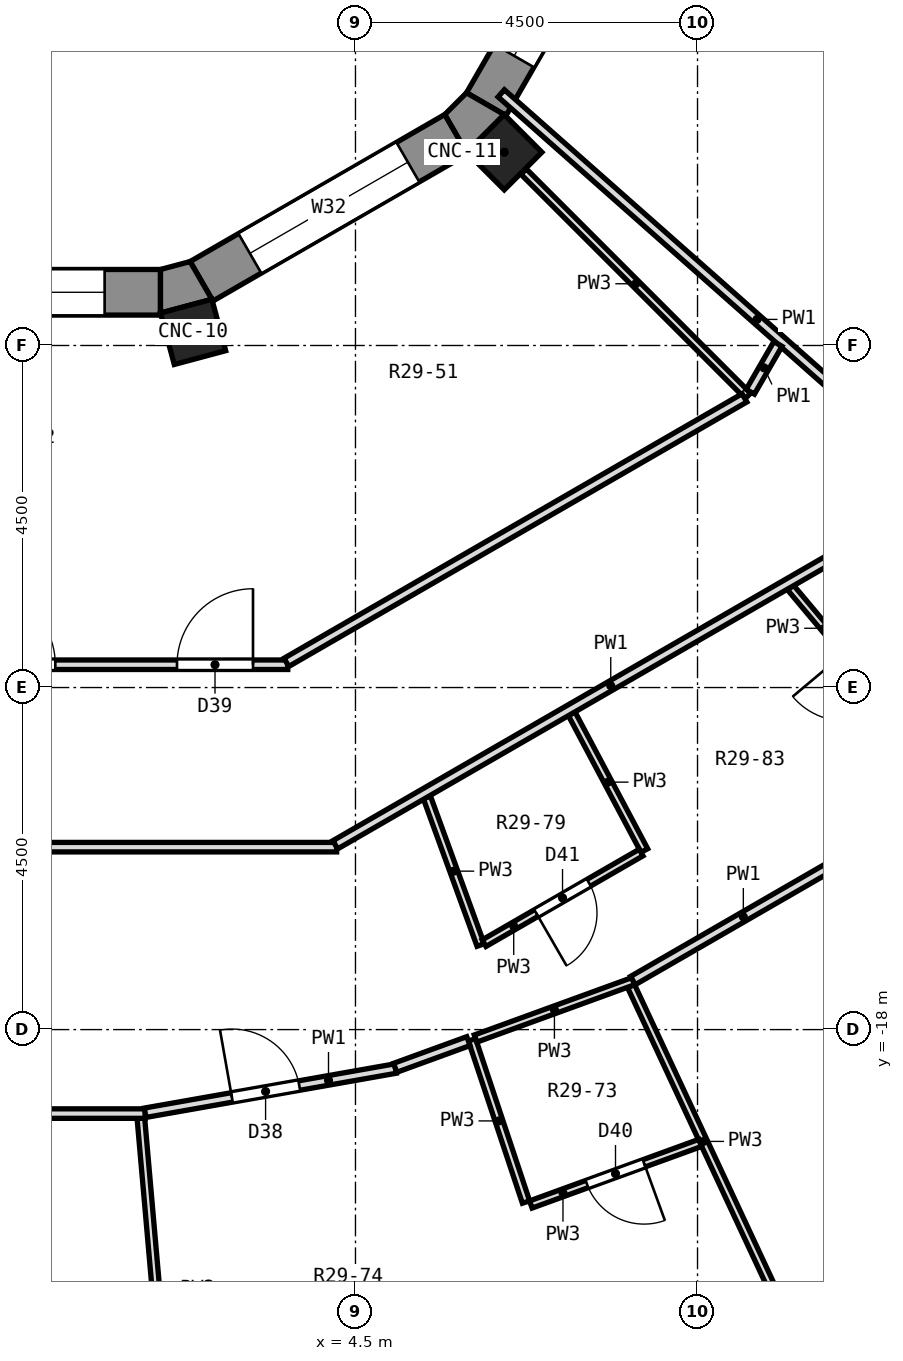
"""IFC4 building model, lengths in metres.
Left out: names, types, materials, properties, quantities, classifications, styles, units other than length and angle.
Written with IfcOpenShell. Run it as: python <this file> out.ifc"""

import sys

from ifc_helpers import new_model, si_unit, direction, frame, frame_2d, origin, origin_2d, place, context, subcontext, project, spatial, polyline, rectangle, outline, extrude, element, fill, save


model = new_model("IFC4")
c1 = context("Model", 3, precision=1e-05, world=origin(), true_north=direction((0.0, 1.0)))
c2 = subcontext(c1, "Body", "Model", "MODEL_VIEW")
j1 = project(units=[si_unit("LENGTHUNIT", "METRE"), si_unit("PLANEANGLEUNIT", "RADIAN")], contexts=[c1])
p1 = place(None, origin())
s1 = spatial("IfcSite", under=j1, at=p1, CompositionType="ELEMENT")
p2 = place(p1, origin())
s2 = spatial("IfcBuilding", under=s1, at=p2, CompositionType="ELEMENT")
p3 = place(p2, frame((0.0, 0.0, 200.4)))
s3 = spatial("IfcBuildingStorey", under=s2, at=p3, CompositionType="ELEMENT", Elevation=200.4)
for number, where, z_axis, x_axis in (
    (1, (2.364, -8.821, 0.0), (0.0, 0.0, 1.0), (0.259, -0.966, 0.0)),
    (2, (6.458, -6.458, 0.0), (0.0, 0.0, 1.0), (0.707, -0.707, 0.0)),
):
    element("IfcColumn", number, at=place(p3, frame(where, z_axis=z_axis, x_axis=x_axis)), inside=s3, PredefinedType="COLUMN", context=c2, shape_type="SweptSolid", body=[
        extrude(rectangle(XDim=0.7, YDim=0.7, at=origin_2d()), origin(), (0.0, 0.0, 1.0), 3.3),
    ])
p4 = place(p3, frame((10.809, -22.171, 0.0), z_axis=(0.0, 0.0, 1.0), x_axis=(0.86602648383, 0.499998129301, 0.0)))
e3 = element("IfcWall", 3, at=p4, inside=s3, PredefinedType="SOLIDWALL", context=c2, shape_type="SweptSolid", body=[
    extrude(rectangle(XDim=3.45, YDim=0.6, at=frame_2d((1.725, 0.0))), origin(), (0.0, 0.0, 1.0), 2.85),
])
p5 = place(p4, frame((0.625, 0.0, 0.9)))
e4 = element("IfcOpeningElement", 4, at=p5, cuts=e3, PredefinedType="OPENING", context=c2, shape_type="SweptSolid", body=[
    extrude(rectangle(XDim=2.2, YDim=1.8, at=frame_2d((1.1, 0.9))), frame((0.0, 0.312, 0.0), z_axis=(0.0, -1.0, 0.0), x_axis=(1.0, 0.0, 0.0)), (0.0, 0.0, 1.0), 0.624),
])
p6 = place(p3, frame((-1.935, -8.3, 0.0), z_axis=(0.0, 0.0, 1.0), x_axis=(1.0, 0.0, 0.0)))
e5 = element("IfcWall", 5, at=p6, inside=s3, PredefinedType="SOLIDWALL", context=c2, shape_type="SweptSolid", body=[
    extrude(rectangle(XDim=3.87, YDim=0.6, at=frame_2d((1.935, 0.0))), origin(), (0.0, 0.0, 1.0), 2.85),
])
p7 = place(p6, frame((0.735, 0.0, 0.9)))
e6 = element("IfcOpeningElement", 6, at=p7, cuts=e5, PredefinedType="OPENING", context=c2, shape_type="SweptSolid", body=[
    extrude(rectangle(XDim=2.4, YDim=1.8, at=frame_2d((1.2, 0.9))), frame((0.0, 0.312, 0.0), z_axis=(0.0, -1.0, 0.0), x_axis=(1.0, 0.0, 0.0)), (0.0, 0.0, 1.0), 0.624),
])
p8 = place(p3, frame((2.474, -8.156, 0.0), z_axis=(0.0, 0.0, 1.0), x_axis=(0.866005929495, 0.500033728941, 0.0)))
e7 = element("IfcWall", 7, at=p8, inside=s3, PredefinedType="SOLIDWALL", context=c2, shape_type="SweptSolid", body=[
    extrude(rectangle(XDim=3.87, YDim=0.6, at=frame_2d((1.935, 0.0))), origin(), (0.0, 0.0, 1.0), 2.85),
])
p9 = place(p8, frame((0.735, 0.0, 0.9)))
e8 = element("IfcOpeningElement", 8, at=p9, cuts=e7, PredefinedType="OPENING", context=c2, shape_type="SweptSolid", body=[
    extrude(rectangle(XDim=2.4, YDim=1.8, at=frame_2d((1.2, 0.9))), frame((0.0, 0.312, 0.0), z_axis=(0.0, -1.0, 0.0), x_axis=(1.0, 0.0, 0.0)), (0.0, 0.0, 1.0), 0.624),
])
p10 = place(p3, frame((6.22, -5.826, 0.0), z_axis=(0.0, 0.0, 1.0), x_axis=(0.500033728941, 0.866005929495, 0.0)))
e9 = element("IfcWall", 9, at=p10, inside=s3, PredefinedType="SOLIDWALL", context=c2, shape_type="SweptSolid", body=[
    extrude(rectangle(XDim=3.87, YDim=0.6, at=frame_2d((1.935, 0.0))), origin(), (0.0, 0.0, 1.0), 2.85),
])
p11 = place(p10, frame((0.735, 0.0, 0.9)))
e10 = element("IfcOpeningElement", 10, at=p11, cuts=e9, PredefinedType="OPENING", context=c2, shape_type="SweptSolid", body=[
    extrude(rectangle(XDim=2.4, YDim=1.8, at=frame_2d((1.2, 0.9))), frame((0.0, 0.312, 0.0), z_axis=(0.0, -1.0, 0.0), x_axis=(1.0, 0.0, 0.0)), (0.0, 0.0, 1.0), 0.624),
])
p12 = place(p3, origin())
e11 = element("IfcWall", 11, at=p12, inside=s3, PredefinedType="SOLIDWALL", context=c2, shape_type="SweptSolid", body=[
    extrude(outline(polyline([(2.611, -8.392), (2.324, -7.896), (1.935, -8.0), (1.935, -8.573), (2.611, -8.392)])), origin(), (0.0, 0.0, 1.0), 2.85),
])
p13 = place(p3, origin())
e12 = element("IfcWall", 12, at=p13, inside=s3, PredefinedType="SOLIDWALL", context=c2, shape_type="SweptSolid", body=[
    extrude(outline(polyline([(5.962, -6.458), (6.458, -5.962), (5.961, -5.676), (5.676, -5.961), (5.962, -6.458)])), origin(), (0.0, 0.0, 1.0), 2.85),
])
p14 = place(p3, frame((1.677, -19.167, 0.0), z_axis=(0.0, 0.0, 1.0), x_axis=(0.087521667832, -0.996162616072, 0.0)))
e13 = element("IfcWall", 13, at=p14, inside=s3, PredefinedType="PARTITIONING", context=c2, shape_type="SweptSolid", body=[
    extrude(rectangle(XDim=4.5, YDim=0.1, at=frame_2d((2.25, 0.0))), origin(), (0.0, 0.0, 1.0), 2.85),
])
p15 = place(p3, frame((6.033, -18.135, 0.0), z_axis=(0.0, 0.0, 1.0), x_axis=(0.316032342538, -0.948748416847, 0.0)))
e14 = element("IfcWall", 14, at=p15, inside=s3, PredefinedType="PARTITIONING", context=c2, shape_type="SweptSolid", body=[
    extrude(rectangle(XDim=2.249, YDim=0.1, at=frame_2d((1.125, 0.0))), origin(), (0.0, 0.0, 1.0), 2.85),
])
p16 = place(p3, frame((5.439, -14.944, 0.0), z_axis=(0.0, 0.0, 1.0), x_axis=(0.341828386263, -0.939762392493, 0.0)))
e15 = element("IfcWall", 15, at=p16, inside=s3, PredefinedType="PARTITIONING", context=c2, shape_type="SweptSolid", body=[
    extrude(rectangle(XDim=2.068, YDim=0.1, at=frame_2d((1.034, 0.0))), origin(), (0.0, 0.0, 1.0), 2.85),
])
p17 = place(p3, frame((8.125, -17.427, 0.0), z_axis=(0.0, 0.0, 1.0), x_axis=(0.422852881861, -0.906198344901, 0.0)))
e16 = element("IfcWall", 16, at=p17, inside=s3, PredefinedType="PARTITIONING", context=c2, shape_type="SweptSolid", body=[
    extrude(rectangle(XDim=4.512, YDim=0.1, at=frame_2d((2.256, 0.0))), origin(), (0.0, 0.0, 1.0), 2.85),
])
p18 = place(p3, frame((7.345, -13.845, 0.0), z_axis=(0.0, 0.0, 1.0), x_axis=(0.46899451783, -0.883201076905, 0.0)))
e17 = element("IfcWall", 17, at=p18, inside=s3, PredefinedType="PARTITIONING", context=c2, shape_type="SweptSolid", body=[
    extrude(rectangle(XDim=2.036, YDim=0.1, at=frame_2d((1.018, 0.0))), origin(), (0.0, 0.0, 1.0), 2.85),
])
p19 = place(p3, frame((10.223, -12.184, 0.0), z_axis=(0.0, 0.0, 1.0), x_axis=(0.642811941649, -0.766024025519, 0.0)))
e18 = element("IfcWall", 18, at=p19, inside=s3, PredefinedType="PARTITIONING", context=c2, shape_type="SweptSolid", body=[
    extrude(rectangle(XDim=3.148, YDim=0.1, at=frame_2d((1.574, 0.0))), origin(), (0.0, 0.0, 1.0), 2.85),
])
p20 = place(p19, frame((1.118, 0.0, 0.0)))
e19 = element("IfcOpeningElement", 19, at=p20, cuts=e18, PredefinedType="OPENING", context=c2, shape_type="SweptSolid", body=[
    extrude(rectangle(XDim=0.9, YDim=2.1, at=frame_2d((0.45, 1.05))), frame((0.0, 0.062, 0.0), z_axis=(0.0, -1.0, 0.0), x_axis=(1.0, 0.0, 0.0)), (0.0, 0.0, 1.0), 0.124),
])
p21 = place(p3, frame((6.712, -6.712, 0.0), z_axis=(0.0, 0.0, 1.0), x_axis=(0.707106781187, -0.707106781187, 0.0)))
e20 = element("IfcWall", 20, at=p21, inside=s3, PredefinedType="PARTITIONING", context=c2, shape_type="SweptSolid", body=[
    extrude(rectangle(XDim=4.174, YDim=0.1, at=frame_2d((2.087, 0.0))), origin(), (0.0, 0.0, 1.0), 2.85),
])
p22 = place(p3, frame((6.418, -5.682, 0.0), z_axis=(0.0, 0.0, 1.0), x_axis=(0.749233096006, -0.662306400278, 0.0)))
e21 = element("IfcWall", 21, at=p22, inside=s3, PredefinedType="PARTITIONING", context=c2, shape_type="SweptSolid", body=[
    extrude(rectangle(XDim=8.982, YDim=0.125, at=frame_2d((4.491, 0.0))), origin(), (0.0, 0.0, 1.0), 2.85),
])
p23 = place(p3, frame((-1.608, -19.105, 0.0), z_axis=(0.0, 0.0, 1.0), x_axis=(1.0, 0.0, 0.0)))
e22 = element("IfcWall", 22, at=p23, inside=s3, PredefinedType="PARTITIONING", context=c2, shape_type="SweptSolid", body=[
    extrude(rectangle(XDim=3.343, YDim=0.125, at=frame_2d((1.671, 0.0))), origin(), (0.0, 0.0, 1.0), 2.85),
])
p24 = place(p3, frame((-4.116, -15.6, 0.0), z_axis=(0.0, 0.0, 1.0), x_axis=(1.0, 0.0, 0.0)))
e23 = element("IfcWall", 23, at=p24, inside=s3, PredefinedType="PARTITIONING", context=c2, shape_type="SweptSolid", body=[
    extrude(rectangle(XDim=8.369, YDim=0.125, at=frame_2d((4.184, 0.0))), origin(), (0.0, 0.0, 1.0), 2.85),
])
p25 = place(p24, frame((0.844, 0.0, 0.0)))
e24 = element("IfcOpeningElement", 24, at=p25, cuts=e23, PredefinedType="OPENING", context=c2, shape_type="SweptSolid", body=[
    extrude(rectangle(XDim=1.0, YDim=2.1, at=frame_2d((0.5, 1.05))), frame((0.0, 0.074, 0.0), z_axis=(0.0, -1.0, 0.0), x_axis=(1.0, 0.0, 0.0)), (0.0, 0.0, 1.0), 0.149),
])
p26 = place(p3, frame((-3.475, -13.2, 0.0), z_axis=(0.0, 0.0, 1.0), x_axis=(1.0, 0.0, 0.0)))
e25 = element("IfcWall", 25, at=p26, inside=s3, PredefinedType="PARTITIONING", context=c2, shape_type="SweptSolid", body=[
    extrude(rectangle(XDim=7.084, YDim=0.125, at=frame_2d((3.542, 0.0))), origin(), (0.0, 0.0, 1.0), 2.85),
])
p27 = place(p26, frame((3.025, 0.0, 0.0)))
e26 = element("IfcOpeningElement", 26, at=p27, cuts=e25, PredefinedType="OPENING", context=c2, shape_type="SweptSolid", body=[
    extrude(rectangle(XDim=1.0, YDim=2.1, at=frame_2d((0.5, 1.05))), frame((0.0, 0.074, 0.0), z_axis=(0.0, -1.0, 0.0), x_axis=(1.0, 0.0, 0.0)), (0.0, 0.0, 1.0), 0.149),
])
p28 = place(p26, frame((5.626, 0.0, 0.0)))
e27 = element("IfcOpeningElement", 27, at=p28, cuts=e25, PredefinedType="OPENING", context=c2, shape_type="SweptSolid", body=[
    extrude(rectangle(XDim=1.0, YDim=2.1, at=frame_2d((0.5, 1.05))), frame((0.0, 0.074, 0.0), z_axis=(0.0, -1.0, 0.0), x_axis=(1.0, 0.0, 0.0)), (0.0, 0.0, 1.0), 0.149),
])
p29 = place(p3, frame((1.732, -19.094, 0.0), z_axis=(0.0, 0.0, 1.0), x_axis=(0.984782824009, 0.173789497774, 0.0)))
e28 = element("IfcWall", 28, at=p29, inside=s3, PredefinedType="PARTITIONING", context=c2, shape_type="SweptSolid", body=[
    extrude(rectangle(XDim=3.345, YDim=0.125, at=frame_2d((1.672, 0.0))), origin(), (0.0, 0.0, 1.0), 2.85),
])
p30 = place(p29, frame((1.159, 0.0, 0.0)))
e29 = element("IfcOpeningElement", 29, at=p30, cuts=e28, PredefinedType="OPENING", context=c2, shape_type="SweptSolid", body=[
    extrude(rectangle(XDim=0.9, YDim=2.1, at=frame_2d((0.45, 1.05))), frame((0.0, 0.074, 0.0), z_axis=(0.0, -1.0, 0.0), x_axis=(1.0, 0.0, 0.0)), (0.0, 0.0, 1.0), 0.149),
])
p31 = place(p3, frame((6.807, -20.301, 0.0), z_axis=(0.0, 0.0, 1.0), x_axis=(0.939763340539, 0.341825779863, 0.0)))
e30 = element("IfcWall", 30, at=p31, inside=s3, PredefinedType="PARTITIONING", context=c2, shape_type="SweptSolid", body=[
    extrude(rectangle(XDim=2.37, YDim=0.1, at=frame_2d((1.185, 0.0))), origin(), (0.0, 0.0, 1.0), 2.85),
])
p32 = place(p31, frame((0.785, 0.0, 0.0)))
e31 = element("IfcOpeningElement", 31, at=p32, cuts=e30, PredefinedType="OPENING", context=c2, shape_type="SweptSolid", body=[
    extrude(rectangle(XDim=0.8, YDim=2.1, at=frame_2d((0.4, 1.05))), frame((0.0, 0.062, 0.0), z_axis=(0.0, -1.0, 0.0), x_axis=(1.0, 0.0, 0.0)), (0.0, 0.0, 1.0), 0.124),
])
p33 = place(p3, frame((6.08, -18.118, 0.0), z_axis=(0.0, 0.0, 1.0), x_axis=(0.939706230865, 0.341982747625, 0.0)))
e32 = element("IfcWall", 32, at=p33, inside=s3, PredefinedType="PARTITIONING", context=c2, shape_type="SweptSolid", body=[
    extrude(rectangle(XDim=2.208, YDim=0.1, at=frame_2d((1.104, 0.0))), origin(), (0.0, 0.0, 1.0), 2.85),
])
p34 = place(p3, frame((5.023, -18.503, 0.0), z_axis=(0.0, 0.0, 1.0), x_axis=(0.939605522223, 0.34225934992, 0.0)))
e33 = element("IfcWall", 33, at=p34, inside=s3, PredefinedType="PARTITIONING", context=c2, shape_type="SweptSolid", body=[
    extrude(rectangle(XDim=1.025, YDim=0.125, at=frame_2d((0.513, 0.0))), origin(), (0.0, 0.0, 1.0), 2.85),
])
p35 = place(p3, frame((8.15, -17.355, 0.0), z_axis=(0.0, 0.0, 1.0), x_axis=(0.86608012654, 0.499905205426, 0.0)))
e34 = element("IfcWall", 34, at=p35, inside=s3, PredefinedType="PARTITIONING", context=c2, shape_type="SweptSolid", body=[
    extrude(rectangle(XDim=3.354, YDim=0.125, at=frame_2d((1.677, 0.0))), origin(), (0.0, 0.0, 1.0), 2.85),
])
p36 = place(p3, frame((6.192, -16.863, 0.0), z_axis=(0.0, 0.0, 1.0), x_axis=(0.866112296403, 0.49984946736, 0.0)))
e35 = element("IfcWall", 35, at=p36, inside=s3, PredefinedType="PARTITIONING", context=c2, shape_type="SweptSolid", body=[
    extrude(rectangle(XDim=2.385, YDim=0.1, at=frame_2d((1.192, 0.0))), origin(), (0.0, 0.0, 1.0), 2.85),
])
p37 = place(p36, frame((0.792, 0.0, 0.0)))
e36 = element("IfcOpeningElement", 36, at=p37, cuts=e35, PredefinedType="OPENING", context=c2, shape_type="SweptSolid", body=[
    extrude(rectangle(XDim=0.8, YDim=2.1, at=frame_2d((0.4, 1.05))), frame((0.0, 0.062, 0.0), z_axis=(0.0, -1.0, 0.0), x_axis=(1.0, 0.0, 0.0)), (0.0, 0.0, 1.0), 0.124),
])
p38 = place(p3, frame((4.234, -15.569, 0.0), z_axis=(0.0, 0.0, 1.0), x_axis=(0.866024799292, 0.50000104701, 0.0)))
e37 = element("IfcWall", 37, at=p38, inside=s3, PredefinedType="PARTITIONING", context=c2, shape_type="SweptSolid", body=[
    extrude(rectangle(XDim=8.37, YDim=0.125, at=frame_2d((4.185, 0.0))), origin(), (0.0, 0.0, 1.0), 2.85),
])
p39 = place(p3, frame((3.591, -13.169, 0.0), z_axis=(0.0, 0.0, 1.0), x_axis=(0.866023753919, 0.50000285764, 0.0)))
e38 = element("IfcWall", 38, at=p39, inside=s3, PredefinedType="PARTITIONING", context=c2, shape_type="SweptSolid", body=[
    extrude(rectangle(XDim=6.959, YDim=0.125, at=frame_2d((3.479, 0.0))), origin(), (0.0, 0.0, 1.0), 2.85),
])
p40 = place(p3, frame((9.694, -9.609, 0.0), z_axis=(0.0, 0.0, 1.0), x_axis=(0.500333617031, 0.865832704204, 0.0)))
e39 = element("IfcWall", 39, at=p40, inside=s3, PredefinedType="PARTITIONING", context=c2, shape_type="SweptSolid", body=[
    extrude(rectangle(XDim=0.726, YDim=0.125, at=frame_2d((0.363, 0.0))), origin(), (0.0, 0.0, 1.0), 2.85),
])
p41 = place(p7, origin())
e40 = element("IfcWindow", 40, at=p41, inside=s3, PartitioningType="SINGLE_PANEL", PredefinedType="WINDOW", context=c2, shape_type="SweptSolid", body=[
    extrude(rectangle(XDim=2.4, YDim=1.8, at=frame_2d((1.2, 0.9))), frame((0.0, -0.12, 0.0), z_axis=(0.0, -1.0, 0.0), x_axis=(1.0, 0.0, 0.0)), (0.0, 0.0, 1.0), 0.06),
])
fill(e6, e40)
p42 = place(p9, origin())
e41 = element("IfcWindow", 41, at=p42, inside=s3, PartitioningType="SINGLE_PANEL", PredefinedType="WINDOW", context=c2, shape_type="SweptSolid", body=[
    extrude(rectangle(XDim=2.4, YDim=1.8, at=frame_2d((1.2, 0.9))), frame((0.0, -0.12, 0.0), z_axis=(0.0, -1.0, 0.0), x_axis=(1.0, 0.0, 0.0)), (0.0, 0.0, 1.0), 0.06),
])
fill(e8, e41)
p43 = place(p11, origin())
e42 = element("IfcWindow", 42, at=p43, inside=s3, PartitioningType="SINGLE_PANEL", PredefinedType="WINDOW", context=c2, shape_type="SweptSolid", body=[
    extrude(rectangle(XDim=2.4, YDim=1.8, at=frame_2d((1.2, 0.9))), frame((0.0, -0.12, 0.0), z_axis=(0.0, -1.0, 0.0), x_axis=(1.0, 0.0, 0.0)), (0.0, 0.0, 1.0), 0.06),
])
fill(e10, e42)
p44 = place(p27, origin())
e43 = element("IfcDoor", 43, at=p44, inside=s3, OperationType="SINGLE_SWING_LEFT", PredefinedType="DOOR", context=c2, shape_type="SweptSolid", body=[
    extrude(rectangle(XDim=1.0, YDim=2.1, at=frame_2d((0.5, 1.05))), frame((0.0, 0.025, 0.0), z_axis=(0.0, -1.0, 0.0), x_axis=(1.0, 0.0, 0.0)), (0.0, 0.0, 1.0), 0.05),
])
fill(e26, e43)
p45 = place(p30, origin())
e44 = element("IfcDoor", 44, at=p45, inside=s3, OperationType="SINGLE_SWING_LEFT", PredefinedType="DOOR", context=c2, shape_type="SweptSolid", body=[
    extrude(rectangle(XDim=0.9, YDim=2.1, at=frame_2d((0.45, 1.05))), frame((0.0, 0.025, 0.0), z_axis=(0.0, -1.0, 0.0), x_axis=(1.0, 0.0, 0.0)), (0.0, 0.0, 1.0), 0.05),
])
fill(e29, e44)
p46 = place(p28, origin())
e45 = element("IfcDoor", 45, at=p46, inside=s3, OperationType="SINGLE_SWING_RIGHT", PredefinedType="DOOR", context=c2, shape_type="SweptSolid", body=[
    extrude(rectangle(XDim=1.0, YDim=2.1, at=frame_2d((0.5, 1.05))), frame((0.0, 0.025, 0.0), z_axis=(0.0, -1.0, 0.0), x_axis=(1.0, 0.0, 0.0)), (0.0, 0.0, 1.0), 0.05),
])
fill(e27, e45)
p47 = place(p32, frame((0.8, 0.0, 0.0), z_axis=(0.0, 0.0, 1.0), x_axis=(-1.0, 0.0, 0.0)))
e46 = element("IfcDoor", 46, at=p47, inside=s3, OperationType="SINGLE_SWING_LEFT", PredefinedType="DOOR", context=c2, shape_type="SweptSolid", body=[
    extrude(rectangle(XDim=0.8, YDim=2.1, at=frame_2d((0.4, 1.05))), frame((0.0, 0.025, 0.0), z_axis=(0.0, -1.0, 0.0), x_axis=(1.0, 0.0, 0.0)), (0.0, 0.0, 1.0), 0.05),
])
fill(e31, e46)
p48 = place(p37, frame((0.8, 0.0, 0.0), z_axis=(0.0, 0.0, 1.0), x_axis=(-1.0, 0.0, 0.0)))
e47 = element("IfcDoor", 47, at=p48, inside=s3, OperationType="SINGLE_SWING_RIGHT", PredefinedType="DOOR", context=c2, shape_type="SweptSolid", body=[
    extrude(rectangle(XDim=0.8, YDim=2.1, at=frame_2d((0.4, 1.05))), frame((0.0, 0.025, 0.0), z_axis=(0.0, -1.0, 0.0), x_axis=(1.0, 0.0, 0.0)), (0.0, 0.0, 1.0), 0.05),
])
fill(e36, e47)
save(model, sys.argv[1])
